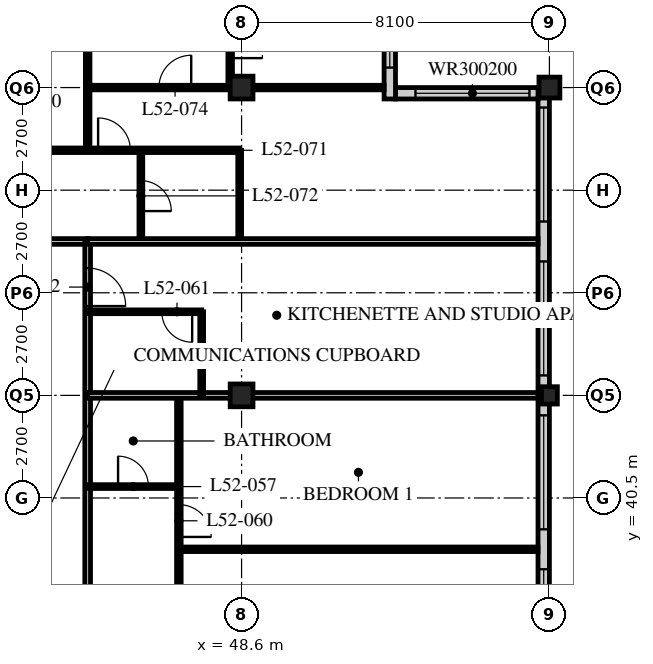
"""IFC4 building model, lengths in metres.
Left out: names, types, materials, properties, quantities, classifications, styles, units other than length and angle.
Written with IfcOpenShell. Run it as: python <this file> out.ifc"""

import sys

from ifc_helpers import new_model, si_unit, direction, frame, frame_2d, origin, origin_2d, place, context, subcontext, project, spatial, rectangle, hollow_rectangle, i_section, extrude, element, fill, save


model = new_model("IFC4")
c1 = context("Model", 3, precision=1e-05, world=origin(), true_north=direction((0.0, 1.0)))
c2 = subcontext(c1, "Body", "Model", "MODEL_VIEW")
j1 = project(units=[si_unit("LENGTHUNIT", "METRE"), si_unit("PLANEANGLEUNIT", "RADIAN")], contexts=[c1])
p1 = place(None, origin())
s1 = spatial("IfcSite", under=j1, at=p1, CompositionType="ELEMENT")
p2 = place(p1, origin())
s2 = spatial("IfcBuilding", under=s1, at=p2, CompositionType="ELEMENT")
p3 = place(p2, frame((0.0, 0.0, 202.8)))
s3 = spatial("IfcBuildingStorey", under=s2, at=p3, CompositionType="ELEMENT", Elevation=202.8)
for number, where, z_axis, x_axis in (
    (1, (48.6, 43.2, 0.0), (0.0, 0.0, 1.0), (1.0, 0.0, 0.0)),
    (2, (48.6, 51.3, 0.0), (0.0, 0.0, 1.0), (1.0, 0.0, 0.0)),
):
    element("IfcColumn", number, at=place(p3, frame(where, z_axis=z_axis, x_axis=x_axis)), inside=s3, PredefinedType="COLUMN", context=c2, shape_type="SweptSolid", body=[
        extrude(hollow_rectangle(XDim=0.6, YDim=0.6, WallThickness=0.05, at=origin_2d()), origin(), (0.0, 0.0, 1.0), 3.6),
    ])
p4 = place(p3, frame((56.7, 43.2, 0.0), z_axis=(0.0, 0.0, 1.0), x_axis=(1.0, 0.0, 0.0)))
e3 = element("IfcColumn", 3, at=p4, inside=s3, PredefinedType="COLUMN", context=c2, shape_type="SweptSolid", body=[
    extrude(i_section(OverallWidth=0.418, OverallDepth=0.456, WebThickness=0.042, FlangeThickness=0.067, FilletRadius=0.015, at=origin_2d()), origin(), (0.0, 0.0, 1.0), 3.6),
])
p5 = place(p3, frame((56.7, 51.3, 0.0), z_axis=(0.0, 0.0, 1.0), x_axis=(1.0, 0.0, 0.0)))
e4 = element("IfcColumn", 4, at=p5, inside=s3, PredefinedType="COLUMN", context=c2, shape_type="SweptSolid", body=[
    extrude(hollow_rectangle(XDim=0.55, YDim=0.55, WallThickness=0.045, at=origin_2d()), origin(), (0.0, 0.0, 1.0), 3.6),
])
p6 = place(p3, frame((56.55, 19.2, 0.0), z_axis=(0.0, 0.0, 1.0), x_axis=(0.0, 1.0, 0.0)))
e5 = element("IfcWall", 5, at=p6, inside=s3, PredefinedType="SOLIDWALL", context=c2, shape_type="SweptSolid", body=[
    extrude(rectangle(XDim=32.1, YDim=0.3, at=frame_2d((16.05, 0.0))), origin(), (0.0, 0.0, 1.0), 3.39),
])
p7 = place(p6, frame((0.225, 0.0, 0.6)))
e6 = element("IfcOpeningElement", 6, at=p7, cuts=e5, PredefinedType="OPENING", context=c2, shape_type="SweptSolid", body=[
    extrude(rectangle(XDim=3.0, YDim=2.4, at=frame_2d((1.5, 1.2))), frame((0.0, 0.16, 0.0), z_axis=(0.0, -1.0, 0.0), x_axis=(1.0, 0.0, 0.0)), (0.0, 0.0, 1.0), 0.32),
])
p8 = place(p6, frame((4.275, 0.0, 0.6)))
e7 = element("IfcOpeningElement", 7, at=p8, cuts=e5, PredefinedType="OPENING", context=c2, shape_type="SweptSolid", body=[
    extrude(rectangle(XDim=3.0, YDim=2.4, at=frame_2d((1.5, 1.2))), frame((0.0, 0.16, 0.0), z_axis=(0.0, -1.0, 0.0), x_axis=(1.0, 0.0, 0.0)), (0.0, 0.0, 1.0), 0.32),
])
p9 = place(p6, frame((8.325, 0.0, 0.6)))
e8 = element("IfcOpeningElement", 8, at=p9, cuts=e5, PredefinedType="OPENING", context=c2, shape_type="SweptSolid", body=[
    extrude(rectangle(XDim=3.0, YDim=2.4, at=frame_2d((1.5, 1.2))), frame((0.0, 0.16, 0.0), z_axis=(0.0, -1.0, 0.0), x_axis=(1.0, 0.0, 0.0)), (0.0, 0.0, 1.0), 0.32),
])
p10 = place(p6, frame((12.375, 0.0, 0.6)))
e9 = element("IfcOpeningElement", 9, at=p10, cuts=e5, PredefinedType="OPENING", context=c2, shape_type="SweptSolid", body=[
    extrude(rectangle(XDim=3.0, YDim=2.4, at=frame_2d((1.5, 1.2))), frame((0.0, 0.16, 0.0), z_axis=(0.0, -1.0, 0.0), x_axis=(1.0, 0.0, 0.0)), (0.0, 0.0, 1.0), 0.32),
])
p11 = place(p6, frame((16.425, 0.0, 0.6)))
e10 = element("IfcOpeningElement", 10, at=p11, cuts=e5, PredefinedType="OPENING", context=c2, shape_type="SweptSolid", body=[
    extrude(rectangle(XDim=3.0, YDim=2.4, at=frame_2d((1.5, 1.2))), frame((0.0, 0.16, 0.0), z_axis=(0.0, -1.0, 0.0), x_axis=(1.0, 0.0, 0.0)), (0.0, 0.0, 1.0), 0.32),
])
p12 = place(p6, frame((20.475, 0.0, 0.6)))
e11 = element("IfcOpeningElement", 11, at=p12, cuts=e5, PredefinedType="OPENING", context=c2, shape_type="SweptSolid", body=[
    extrude(rectangle(XDim=3.0, YDim=2.4, at=frame_2d((1.5, 1.2))), frame((0.0, 0.16, 0.0), z_axis=(0.0, -1.0, 0.0), x_axis=(1.0, 0.0, 0.0)), (0.0, 0.0, 1.0), 0.32),
])
p13 = place(p6, frame((24.525, 0.0, 0.6)))
e12 = element("IfcOpeningElement", 12, at=p13, cuts=e5, PredefinedType="OPENING", context=c2, shape_type="SweptSolid", body=[
    extrude(rectangle(XDim=3.0, YDim=2.4, at=frame_2d((1.5, 1.2))), frame((0.0, 0.16, 0.0), z_axis=(0.0, -1.0, 0.0), x_axis=(1.0, 0.0, 0.0)), (0.0, 0.0, 1.0), 0.32),
])
p14 = place(p6, frame((28.575, 0.0, 0.6)))
e13 = element("IfcOpeningElement", 13, at=p14, cuts=e5, PredefinedType="OPENING", context=c2, shape_type="SweptSolid", body=[
    extrude(rectangle(XDim=3.0, YDim=2.4, at=frame_2d((1.5, 1.2))), frame((0.0, 0.16, 0.0), z_axis=(0.0, -1.0, 0.0), x_axis=(1.0, 0.0, 0.0)), (0.0, 0.0, 1.0), 0.32),
])
p15 = place(p3, frame((56.4, 51.15, 0.0), z_axis=(0.0, 0.0, 1.0), x_axis=(-1.0, 0.0, 0.0)))
e14 = element("IfcWall", 14, at=p15, inside=s3, PredefinedType="SOLIDWALL", context=c2, shape_type="SweptSolid", body=[
    extrude(rectangle(XDim=3.75, YDim=0.3, at=frame_2d((1.875, 0.0))), origin(), (0.0, 0.0, 1.0), 3.39),
])
p16 = place(p15, frame((0.225, 0.0, 0.6)))
e15 = element("IfcOpeningElement", 15, at=p16, cuts=e14, PredefinedType="OPENING", context=c2, shape_type="SweptSolid", body=[
    extrude(rectangle(XDim=3.0, YDim=2.0, at=frame_2d((1.5, 1.0))), frame((0.0, 0.16, 0.0), z_axis=(0.0, -1.0, 0.0), x_axis=(1.0, 0.0, 0.0)), (0.0, 0.0, 1.0), 0.32),
])
p17 = place(p3, frame((52.5, 51.0, 0.0), z_axis=(0.0, 0.0, 1.0), x_axis=(0.0, 1.0, 0.0)))
e16 = element("IfcWall", 16, at=p17, inside=s3, PredefinedType="SOLIDWALL", context=c2, shape_type="SweptSolid", body=[
    extrude(rectangle(XDim=4.35, YDim=0.3, at=frame_2d((2.175, 0.0))), origin(), (0.0, 0.0, 1.0), 3.39),
])
p18 = place(p17, frame((0.825, 0.0, 0.6)))
e17 = element("IfcOpeningElement", 17, at=p18, cuts=e16, PredefinedType="OPENING", context=c2, shape_type="SweptSolid", body=[
    extrude(rectangle(XDim=3.0, YDim=2.0, at=frame_2d((1.5, 1.0))), frame((0.0, 0.16, 0.0), z_axis=(0.0, -1.0, 0.0), x_axis=(1.0, 0.0, 0.0)), (0.0, 0.0, 1.0), 0.32),
])
p19 = place(p3, frame((8.1, 47.25, 0.0), z_axis=(0.0, 0.0, 1.0), x_axis=(1.0, 0.0, 0.0)))
e18 = element("IfcWall", 18, at=p19, inside=s3, PredefinedType="PARTITIONING", context=c2, shape_type="SweptSolid", body=[
    extrude(rectangle(XDim=36.45, YDim=0.15, at=frame_2d((18.225, 0.0))), origin(), (0.0, 0.0, 1.0), 3.39),
])
p20 = place(p19, frame((4.45, 0.0, 0.0)))
e19 = element("IfcOpeningElement", 19, at=p20, cuts=e18, PredefinedType="OPENING", context=c2, shape_type="SweptSolid", body=[
    extrude(rectangle(XDim=1.0, YDim=2.1, at=frame_2d((0.5, 1.05))), frame((0.0, 0.085, 0.0), z_axis=(0.0, -1.0, 0.0), x_axis=(1.0, 0.0, 0.0)), (0.0, 0.0, 1.0), 0.17),
])
p21 = place(p19, frame((12.55, 0.0, 0.0)))
e20 = element("IfcOpeningElement", 20, at=p21, cuts=e18, PredefinedType="OPENING", context=c2, shape_type="SweptSolid", body=[
    extrude(rectangle(XDim=1.0, YDim=2.1, at=frame_2d((0.5, 1.05))), frame((0.0, 0.085, 0.0), z_axis=(0.0, -1.0, 0.0), x_axis=(1.0, 0.0, 0.0)), (0.0, 0.0, 1.0), 0.17),
])
p22 = place(p19, frame((30.7, 0.0, 0.0)))
e21 = element("IfcOpeningElement", 21, at=p22, cuts=e18, PredefinedType="OPENING", context=c2, shape_type="SweptSolid", body=[
    extrude(rectangle(XDim=1.0, YDim=2.1, at=frame_2d((0.5, 1.05))), frame((0.0, 0.085, 0.0), z_axis=(0.0, -1.0, 0.0), x_axis=(1.0, 0.0, 0.0)), (0.0, 0.0, 1.0), 0.17),
])
p23 = place(p19, frame((33.925, 0.0, 0.0)))
e22 = element("IfcOpeningElement", 22, at=p23, cuts=e18, PredefinedType="OPENING", context=c2, shape_type="SweptSolid", body=[
    extrude(rectangle(XDim=1.0, YDim=2.1, at=frame_2d((0.5, 1.05))), frame((0.0, 0.085, 0.0), z_axis=(0.0, -1.0, 0.0), x_axis=(1.0, 0.0, 0.0)), (0.0, 0.0, 1.0), 0.17),
])
p24 = place(p19, frame((1.525, 0.0, 0.0)))
e23 = element("IfcOpeningElement", 23, at=p24, cuts=e18, PredefinedType="OPENING", context=c2, shape_type="SweptSolid", body=[
    extrude(rectangle(XDim=1.0, YDim=2.1, at=frame_2d((0.5, 1.05))), frame((0.0, 0.085, 0.0), z_axis=(0.0, -1.0, 0.0), x_axis=(1.0, 0.0, 0.0)), (0.0, 0.0, 1.0), 0.17),
])
p25 = place(p3, frame((44.55, 18.9, 0.0), z_axis=(0.0, 0.0, 1.0), x_axis=(0.0, 1.0, 0.0)))
e24 = element("IfcWall", 24, at=p25, inside=s3, PredefinedType="PARTITIONING", context=c2, shape_type="SweptSolid", body=[
    extrude(rectangle(XDim=28.35, YDim=0.15, at=frame_2d((14.175, 0.0))), origin(), (0.0, 0.0, 1.0), 3.39),
])
p26 = place(p25, frame((0.4, 0.0, 0.0)))
e25 = element("IfcOpeningElement", 25, at=p26, cuts=e24, PredefinedType="OPENING", context=c2, shape_type="SweptSolid", body=[
    extrude(rectangle(XDim=1.0, YDim=2.1, at=frame_2d((0.5, 1.05))), frame((0.0, 0.085, 0.0), z_axis=(0.0, -1.0, 0.0), x_axis=(1.0, 0.0, 0.0)), (0.0, 0.0, 1.0), 0.17),
])
p27 = place(p25, frame((12.55, 0.0, 0.0)))
e26 = element("IfcOpeningElement", 26, at=p27, cuts=e24, PredefinedType="OPENING", context=c2, shape_type="SweptSolid", body=[
    extrude(rectangle(XDim=1.0, YDim=2.1, at=frame_2d((0.5, 1.05))), frame((0.0, 0.085, 0.0), z_axis=(0.0, -1.0, 0.0), x_axis=(1.0, 0.0, 0.0)), (0.0, 0.0, 1.0), 0.17),
])
p28 = place(p25, frame((26.65, 0.0, 0.0)))
e27 = element("IfcOpeningElement", 27, at=p28, cuts=e24, PredefinedType="OPENING", context=c2, shape_type="SweptSolid", body=[
    extrude(rectangle(XDim=1.0, YDim=2.1, at=frame_2d((0.5, 1.05))), frame((0.0, 0.085, 0.0), z_axis=(0.0, -1.0, 0.0), x_axis=(1.0, 0.0, 0.0)), (0.0, 0.0, 1.0), 0.17),
])
p29 = place(p3, frame((46.95, 18.9, 0.0), z_axis=(0.0, 0.0, 1.0), x_axis=(0.0, 1.0, 0.0)))
e28 = element("IfcWall", 28, at=p29, inside=s3, PredefinedType="PARTITIONING", context=c2, shape_type="SweptSolid", body=[
    extrude(rectangle(XDim=24.3, YDim=0.12, at=frame_2d((12.15, 0.0))), origin(), (0.0, 0.0, 1.0), 3.39),
])
p30 = place(p29, frame((0.975, 0.0, 0.0)))
e29 = element("IfcOpeningElement", 29, at=p30, cuts=e28, PredefinedType="OPENING", context=c2, shape_type="SweptSolid", body=[
    extrude(rectangle(XDim=0.85, YDim=2.1, at=frame_2d((0.425, 1.05))), frame((0.0, 0.07, 0.0), z_axis=(0.0, -1.0, 0.0), x_axis=(1.0, 0.0, 0.0)), (0.0, 0.0, 1.0), 0.14),
])
p31 = place(p29, frame((8.425, 0.0, 0.0)))
e30 = element("IfcOpeningElement", 30, at=p31, cuts=e28, PredefinedType="OPENING", context=c2, shape_type="SweptSolid", body=[
    extrude(rectangle(XDim=0.85, YDim=2.1, at=frame_2d((0.425, 1.05))), frame((0.0, 0.07, 0.0), z_axis=(0.0, -1.0, 0.0), x_axis=(1.0, 0.0, 0.0)), (0.0, 0.0, 1.0), 0.14),
])
p32 = place(p29, frame((13.125, 0.0, 0.0)))
e31 = element("IfcOpeningElement", 31, at=p32, cuts=e28, PredefinedType="OPENING", context=c2, shape_type="SweptSolid", body=[
    extrude(rectangle(XDim=0.85, YDim=2.1, at=frame_2d((0.425, 1.05))), frame((0.0, 0.07, 0.0), z_axis=(0.0, -1.0, 0.0), x_axis=(1.0, 0.0, 0.0)), (0.0, 0.0, 1.0), 0.14),
])
p33 = place(p29, frame((20.575, 0.0, 0.0)))
e32 = element("IfcOpeningElement", 32, at=p33, cuts=e28, PredefinedType="OPENING", context=c2, shape_type="SweptSolid", body=[
    extrude(rectangle(XDim=0.85, YDim=2.1, at=frame_2d((0.425, 1.05))), frame((0.0, 0.07, 0.0), z_axis=(0.0, -1.0, 0.0), x_axis=(1.0, 0.0, 0.0)), (0.0, 0.0, 1.0), 0.14),
])
p34 = place(p3, frame((44.55, 40.8, 0.0), z_axis=(0.0, 0.0, 1.0), x_axis=(1.0, 0.0, 0.0)))
e33 = element("IfcWall", 33, at=p34, inside=s3, PredefinedType="PARTITIONING", context=c2, shape_type="SweptSolid", body=[
    extrude(rectangle(XDim=2.4, YDim=0.1, at=frame_2d((1.2, 0.0))), origin(), (0.0, 0.0, 1.0), 3.39),
])
p35 = place(p34, frame((0.8, 0.0, 0.0)))
e34 = element("IfcOpeningElement", 34, at=p35, cuts=e33, PredefinedType="OPENING", context=c2, shape_type="SweptSolid", body=[
    extrude(rectangle(XDim=0.8, YDim=2.1, at=frame_2d((0.4, 1.05))), frame((0.0, 0.06, 0.0), z_axis=(0.0, -1.0, 0.0), x_axis=(1.0, 0.0, 0.0)), (0.0, 0.0, 1.0), 0.12),
])
p36 = place(p3, frame((46.95, 39.15, 0.0), z_axis=(0.0, 0.0, 1.0), x_axis=(1.0, 0.0, 0.0)))
e35 = element("IfcWall", 35, at=p36, inside=s3, PredefinedType="PARTITIONING", context=c2, shape_type="SweptSolid", body=[
    extrude(rectangle(XDim=9.45, YDim=0.12, at=frame_2d((4.725, 0.0))), origin(), (0.0, 0.0, 1.0), 3.39),
])
p37 = place(p3, frame((44.55, 43.2, 0.0), z_axis=(0.0, 0.0, 1.0), x_axis=(1.0, 0.0, 0.0)))
e36 = element("IfcWall", 36, at=p37, inside=s3, PredefinedType="PARTITIONING", context=c2, shape_type="SweptSolid", body=[
    extrude(rectangle(XDim=11.85, YDim=0.15, at=frame_2d((5.925, 0.0))), origin(), (0.0, 0.0, 1.0), 2.778),
])
p38 = place(p3, frame((47.55, 43.2, 0.0), z_axis=(0.0, 0.0, 1.0), x_axis=(0.0, 1.0, 0.0)))
e37 = element("IfcWall", 37, at=p38, inside=s3, PredefinedType="PARTITIONING", context=c2, shape_type="SweptSolid", body=[
    extrude(rectangle(XDim=2.2, YDim=0.1, at=frame_2d((1.1, 0.0))), origin(), (0.0, 0.0, 1.0), 3.39),
])
p39 = place(p3, frame((44.55, 45.4, 0.0), z_axis=(0.0, 0.0, 1.0), x_axis=(1.0, 0.0, 0.0)))
e38 = element("IfcWall", 38, at=p39, inside=s3, PredefinedType="PARTITIONING", context=c2, shape_type="SweptSolid", body=[
    extrude(rectangle(XDim=3.0, YDim=0.1, at=frame_2d((1.5, 0.0))), origin(), (0.0, 0.0, 1.0), 3.39),
])
p40 = place(p39, frame((1.95, 0.0, 0.0)))
e39 = element("IfcOpeningElement", 39, at=p40, cuts=e38, PredefinedType="OPENING", context=c2, shape_type="SweptSolid", body=[
    extrude(rectangle(XDim=0.8, YDim=2.1, at=frame_2d((0.4, 1.05))), frame((0.0, 0.06, 0.0), z_axis=(0.0, -1.0, 0.0), x_axis=(1.0, 0.0, 0.0)), (0.0, 0.0, 1.0), 0.12),
])
p41 = place(p3, frame((40.5, 49.65, 0.0), z_axis=(0.0, 0.0, 1.0), x_axis=(1.0, 0.0, 0.0)))
e40 = element("IfcWall", 40, at=p41, inside=s3, PredefinedType="PARTITIONING", context=c2, shape_type="SweptSolid", body=[
    extrude(rectangle(XDim=8.05, YDim=0.12, at=frame_2d((4.025, 0.0))), origin(), (0.0, 0.0, 1.0), 3.39),
])
p42 = place(p41, frame((0.475, 0.0, 0.0)))
e41 = element("IfcOpeningElement", 41, at=p42, cuts=e40, PredefinedType="OPENING", context=c2, shape_type="SweptSolid", body=[
    extrude(rectangle(XDim=0.85, YDim=2.1, at=frame_2d((0.425, 1.05))), frame((0.0, 0.07, 0.0), z_axis=(0.0, -1.0, 0.0), x_axis=(1.0, 0.0, 0.0)), (0.0, 0.0, 1.0), 0.14),
])
p43 = place(p41, frame((4.325, 0.0, 0.0)))
e42 = element("IfcOpeningElement", 42, at=p43, cuts=e40, PredefinedType="OPENING", context=c2, shape_type="SweptSolid", body=[
    extrude(rectangle(XDim=0.85, YDim=2.1, at=frame_2d((0.425, 1.05))), frame((0.0, 0.07, 0.0), z_axis=(0.0, -1.0, 0.0), x_axis=(1.0, 0.0, 0.0)), (0.0, 0.0, 1.0), 0.14),
])
p44 = place(p3, frame((45.95, 47.25, 0.0), z_axis=(0.0, 0.0, 1.0), x_axis=(0.0, 1.0, 0.0)))
e43 = element("IfcWall", 43, at=p44, inside=s3, PredefinedType="PARTITIONING", context=c2, shape_type="SweptSolid", body=[
    extrude(rectangle(XDim=2.4, YDim=0.1, at=frame_2d((1.2, 0.0))), origin(), (0.0, 0.0, 1.0), 3.39),
])
p45 = place(p44, frame((0.8, 0.0, 0.0)))
e44 = element("IfcOpeningElement", 44, at=p45, cuts=e43, PredefinedType="OPENING", context=c2, shape_type="SweptSolid", body=[
    extrude(rectangle(XDim=0.8, YDim=2.1, at=frame_2d((0.4, 1.05))), frame((0.0, 0.06, 0.0), z_axis=(0.0, -1.0, 0.0), x_axis=(1.0, 0.0, 0.0)), (0.0, 0.0, 1.0), 0.12),
])
p46 = place(p3, frame((48.55, 47.25, 0.0), z_axis=(0.0, 0.0, 1.0), x_axis=(0.0, 1.0, 0.0)))
e45 = element("IfcWall", 45, at=p46, inside=s3, PredefinedType="PARTITIONING", context=c2, shape_type="SweptSolid", body=[
    extrude(rectangle(XDim=2.4, YDim=0.1, at=frame_2d((1.2, 0.0))), origin(), (0.0, 0.0, 1.0), 2.778),
])
p47 = place(p3, frame((44.55, 49.65, 0.0), z_axis=(0.0, 0.0, 1.0), x_axis=(0.0, 1.0, 0.0)))
e46 = element("IfcWall", 46, at=p47, inside=s3, PredefinedType="PARTITIONING", context=c2, shape_type="SweptSolid", body=[
    extrude(rectangle(XDim=9.45, YDim=0.12, at=frame_2d((4.725, 0.0))), origin(), (0.0, 0.0, 1.0), 3.39),
])
p48 = place(p3, frame((44.55, 51.3, 0.0), z_axis=(0.0, 0.0, 1.0), x_axis=(1.0, 0.0, 0.0)))
e47 = element("IfcWall", 47, at=p48, inside=s3, PredefinedType="PARTITIONING", context=c2, shape_type="SweptSolid", body=[
    extrude(rectangle(XDim=7.8, YDim=0.12, at=frame_2d((3.9, 0.0))), origin(), (0.0, 0.0, 1.0), 2.778),
])
p49 = place(p48, frame((1.875, 0.0, 0.0)))
e48 = element("IfcOpeningElement", 48, at=p49, cuts=e47, PredefinedType="OPENING", context=c2, shape_type="SweptSolid", body=[
    extrude(rectangle(XDim=0.85, YDim=2.1, at=frame_2d((0.425, 1.05))), frame((0.0, 0.07, 0.0), z_axis=(0.0, -1.0, 0.0), x_axis=(1.0, 0.0, 0.0)), (0.0, 0.0, 1.0), 0.14),
])
p50 = place(p3, frame((44.55, 47.25, 0.0), z_axis=(0.0, 0.0, 1.0), x_axis=(1.0, 0.0, 0.0)))
e49 = element("IfcWall", 49, at=p50, inside=s3, PredefinedType="PARTITIONING", context=c2, shape_type="SweptSolid", body=[
    extrude(rectangle(XDim=11.85, YDim=0.15, at=frame_2d((5.925, 0.0))), origin(), (0.0, 0.0, 1.0), 3.39),
])
p51 = place(p3, frame((48.3, 51.3, 0.0), z_axis=(0.0, 0.0, 1.0), x_axis=(0.0, 1.0, 0.0)))
e50 = element("IfcWall", 50, at=p51, inside=s3, PredefinedType="PARTITIONING", context=c2, shape_type="SweptSolid", body=[
    extrude(rectangle(XDim=3.75, YDim=0.12, at=frame_2d((1.875, 0.0))), origin(), (0.0, 0.0, 1.0), 3.39),
])
p52 = place(p51, frame((0.775, 0.0, 0.0)))
e51 = element("IfcOpeningElement", 51, at=p52, cuts=e50, PredefinedType="OPENING", context=c2, shape_type="SweptSolid", body=[
    extrude(rectangle(XDim=0.85, YDim=2.1, at=frame_2d((0.425, 1.05))), frame((0.0, 0.07, 0.0), z_axis=(0.0, -1.0, 0.0), x_axis=(1.0, 0.0, 0.0)), (0.0, 0.0, 1.0), 0.14),
])
p53 = place(p11, origin())
e52 = element("IfcWindow", 52, at=p53, inside=s3, PartitioningType="SINGLE_PANEL", PredefinedType="WINDOW", context=c2, shape_type="SweptSolid", body=[
    extrude(rectangle(XDim=3.0, YDim=2.4, at=frame_2d((1.5, 1.2))), frame((0.0, 0.03, 0.0), z_axis=(0.0, -1.0, 0.0), x_axis=(1.0, 0.0, 0.0)), (0.0, 0.0, 1.0), 0.06),
])
fill(e10, e52)
p54 = place(p12, origin())
e53 = element("IfcWindow", 53, at=p54, inside=s3, PartitioningType="SINGLE_PANEL", PredefinedType="WINDOW", context=c2, shape_type="SweptSolid", body=[
    extrude(rectangle(XDim=3.0, YDim=2.4, at=frame_2d((1.5, 1.2))), frame((0.0, 0.03, 0.0), z_axis=(0.0, -1.0, 0.0), x_axis=(1.0, 0.0, 0.0)), (0.0, 0.0, 1.0), 0.06),
])
fill(e11, e53)
p55 = place(p13, origin())
e54 = element("IfcWindow", 54, at=p55, inside=s3, PartitioningType="SINGLE_PANEL", PredefinedType="WINDOW", context=c2, shape_type="SweptSolid", body=[
    extrude(rectangle(XDim=3.0, YDim=2.4, at=frame_2d((1.5, 1.2))), frame((0.0, 0.03, 0.0), z_axis=(0.0, -1.0, 0.0), x_axis=(1.0, 0.0, 0.0)), (0.0, 0.0, 1.0), 0.06),
])
fill(e12, e54)
p56 = place(p14, origin())
e55 = element("IfcWindow", 55, at=p56, inside=s3, PartitioningType="SINGLE_PANEL", PredefinedType="WINDOW", context=c2, shape_type="SweptSolid", body=[
    extrude(rectangle(XDim=3.0, YDim=2.4, at=frame_2d((1.5, 1.2))), frame((0.0, 0.03, 0.0), z_axis=(0.0, -1.0, 0.0), x_axis=(1.0, 0.0, 0.0)), (0.0, 0.0, 1.0), 0.06),
])
fill(e13, e55)
p57 = place(p16, origin())
e56 = element("IfcWindow", 56, at=p57, inside=s3, PartitioningType="SINGLE_PANEL", PredefinedType="WINDOW", context=c2, shape_type="SweptSolid", body=[
    extrude(rectangle(XDim=3.0, YDim=2.0, at=frame_2d((1.5, 1.0))), frame((0.0, 0.03, 0.0), z_axis=(0.0, -1.0, 0.0), x_axis=(1.0, 0.0, 0.0)), (0.0, 0.0, 1.0), 0.06),
])
fill(e15, e56)
p58 = place(p18, origin())
e57 = element("IfcWindow", 57, at=p58, inside=s3, PartitioningType="SINGLE_PANEL", PredefinedType="WINDOW", context=c2, shape_type="SweptSolid", body=[
    extrude(rectangle(XDim=3.0, YDim=2.0, at=frame_2d((1.5, 1.0))), frame((0.0, 0.03, 0.0), z_axis=(0.0, -1.0, 0.0), x_axis=(1.0, 0.0, 0.0)), (0.0, 0.0, 1.0), 0.06),
])
fill(e17, e57)
p59 = place(p35, origin())
e58 = element("IfcDoor", 58, at=p59, inside=s3, OperationType="SINGLE_SWING_LEFT", PredefinedType="DOOR", context=c2, shape_type="SweptSolid", body=[
    extrude(rectangle(XDim=0.8, YDim=2.1, at=frame_2d((0.4, 1.05))), frame((0.0, 0.025, 0.0), z_axis=(0.0, -1.0, 0.0), x_axis=(1.0, 0.0, 0.0)), (0.0, 0.0, 1.0), 0.05),
])
fill(e34, e58)
p60 = place(p33, origin())
e59 = element("IfcDoor", 59, at=p60, inside=s3, OperationType="SINGLE_SWING_RIGHT", PredefinedType="DOOR", context=c2, shape_type="SweptSolid", body=[
    extrude(rectangle(XDim=0.85, YDim=2.1, at=frame_2d((0.425, 1.05))), frame((0.0, 0.025, 0.0), z_axis=(0.0, -1.0, 0.0), x_axis=(1.0, 0.0, 0.0)), (0.0, 0.0, 1.0), 0.05),
])
fill(e32, e59)
p61 = place(p40, origin())
e60 = element("IfcDoor", 60, at=p61, inside=s3, OperationType="SINGLE_SWING_LEFT", PredefinedType="DOOR", context=c2, shape_type="SweptSolid", body=[
    extrude(rectangle(XDim=0.8, YDim=2.1, at=frame_2d((0.4, 1.05))), frame((0.0, 0.025, 0.0), z_axis=(0.0, -1.0, 0.0), x_axis=(1.0, 0.0, 0.0)), (0.0, 0.0, 1.0), 0.05),
])
fill(e39, e60)
p62 = place(p28, origin())
e61 = element("IfcDoor", 61, at=p62, inside=s3, OperationType="SINGLE_SWING_RIGHT", PredefinedType="DOOR", context=c2, shape_type="SweptSolid", body=[
    extrude(rectangle(XDim=1.0, YDim=2.1, at=frame_2d((0.5, 1.05))), frame((0.0, 0.025, 0.0), z_axis=(0.0, -1.0, 0.0), x_axis=(1.0, 0.0, 0.0)), (0.0, 0.0, 1.0), 0.05),
])
fill(e27, e61)
p63 = place(p45, origin())
e62 = element("IfcDoor", 62, at=p63, inside=s3, OperationType="SINGLE_SWING_RIGHT", PredefinedType="DOOR", context=c2, shape_type="SweptSolid", body=[
    extrude(rectangle(XDim=0.8, YDim=2.1, at=frame_2d((0.4, 1.05))), frame((0.0, 0.025, 0.0), z_axis=(0.0, -1.0, 0.0), x_axis=(1.0, 0.0, 0.0)), (0.0, 0.0, 1.0), 0.05),
])
fill(e44, e62)
p64 = place(p43, origin())
e63 = element("IfcDoor", 63, at=p64, inside=s3, OperationType="SINGLE_SWING_LEFT", PredefinedType="DOOR", context=c2, shape_type="SweptSolid", body=[
    extrude(rectangle(XDim=0.85, YDim=2.1, at=frame_2d((0.425, 1.05))), frame((0.0, 0.025, 0.0), z_axis=(0.0, -1.0, 0.0), x_axis=(1.0, 0.0, 0.0)), (0.0, 0.0, 1.0), 0.05),
])
fill(e42, e63)
p65 = place(p49, origin())
e64 = element("IfcDoor", 64, at=p65, inside=s3, OperationType="SINGLE_SWING_RIGHT", PredefinedType="DOOR", context=c2, shape_type="SweptSolid", body=[
    extrude(rectangle(XDim=0.85, YDim=2.1, at=frame_2d((0.425, 1.05))), frame((0.0, 0.025, 0.0), z_axis=(0.0, -1.0, 0.0), x_axis=(1.0, 0.0, 0.0)), (0.0, 0.0, 1.0), 0.05),
])
fill(e48, e64)
p66 = place(p52, origin())
e65 = element("IfcDoor", 65, at=p66, inside=s3, OperationType="SINGLE_SWING_RIGHT", PredefinedType="DOOR", context=c2, shape_type="SweptSolid", body=[
    extrude(rectangle(XDim=0.85, YDim=2.1, at=frame_2d((0.425, 1.05))), frame((0.0, 0.025, 0.0), z_axis=(0.0, -1.0, 0.0), x_axis=(1.0, 0.0, 0.0)), (0.0, 0.0, 1.0), 0.05),
])
fill(e51, e65)
save(model, sys.argv[1])
